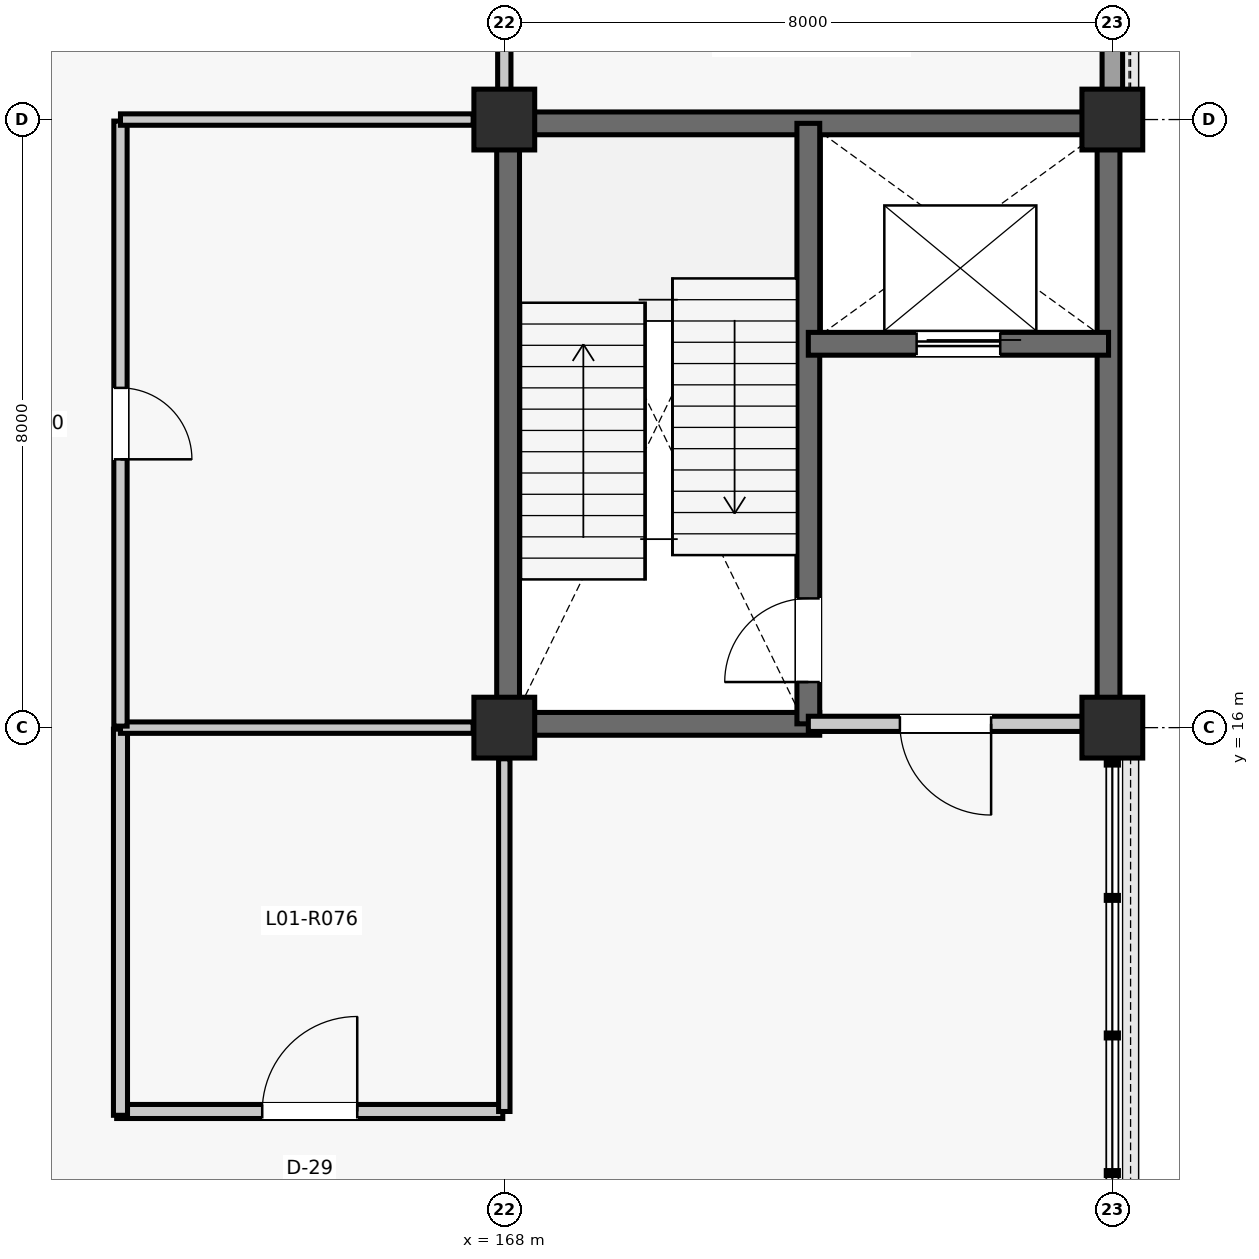
"""IFC4 building model, lengths in metres.
Left out: names, types, materials, properties, quantities, classifications, styles, units other than length and angle.
Written with IfcOpenShell. Run it as: python <this file> out.ifc"""

import sys

from ifc_helpers import new_model, si_unit, direction, frame, frame_2d, origin, origin_2d, place, context, subcontext, project, spatial, rectangle, extrude, element, fill, save


model = new_model("IFC4")
c1 = context("Model", 3, precision=1e-05, world=origin(), true_north=direction((0.0, 1.0)))
c2 = subcontext(c1, "Body", "Model", "MODEL_VIEW")
j1 = project(units=[si_unit("LENGTHUNIT", "METRE"), si_unit("PLANEANGLEUNIT", "RADIAN")], contexts=[c1])
p1 = place(None, origin())
s1 = spatial("IfcSite", under=j1, at=p1, CompositionType="ELEMENT")
p2 = place(p1, origin())
s2 = spatial("IfcBuilding", under=s1, at=p2, CompositionType="ELEMENT")
p3 = place(p2, frame((0.0, 0.0, 5.28)))
s3 = spatial("IfcBuildingStorey", under=s2, at=p3, CompositionType="ELEMENT", Elevation=5.28)
for number, where, z_axis, x_axis in (
    (1, (168.0, 16.0, 0.0), (0.0, 0.0, 1.0), (1.0, 0.0, 0.0)),
    (2, (168.0, 24.0, 0.0), (0.0, 0.0, 1.0), (1.0, 0.0, 0.0)),
    (3, (176.0, 16.0, 0.0), (0.0, 0.0, 1.0), (1.0, 0.0, 0.0)),
    (4, (176.0, 24.0, 0.0), (0.0, 0.0, 1.0), (1.0, 0.0, 0.0)),
):
    element("IfcColumn", number, at=place(p3, frame(where, z_axis=z_axis, x_axis=x_axis)), inside=s3, PredefinedType="COLUMN", context=c2, shape_type="SweptSolid", body=[
        extrude(rectangle(XDim=0.8, YDim=0.8, at=origin_2d()), origin(), (0.0, 0.0, 1.0), 4.62),
    ])
p4 = place(p3, frame((176.0, 24.385, 0.0), z_axis=(0.0, 0.0, 1.0), x_axis=(0.0, 1.0, 0.0)))
e5 = element("IfcWall", 5, at=p4, inside=s3, PredefinedType="SOLIDWALL", context=c2, shape_type="SweptSolid", body=[
    extrude(rectangle(XDim=7.33, YDim=0.27, at=frame_2d((3.665, 0.0))), origin(), (0.0, 0.0, 1.0), 3.914),
])
p5 = place(p4, frame((2.465, 0.0, 0.9)))
e6 = element("IfcOpeningElement", 6, at=p5, cuts=e5, PredefinedType="OPENING", context=c2, shape_type="SweptSolid", body=[
    extrude(rectangle(XDim=2.4, YDim=2.4, at=frame_2d((1.2, 1.2))), frame((0.0, 0.145, 0.0), z_axis=(0.0, -1.0, 0.0), x_axis=(1.0, 0.0, 0.0)), (0.0, 0.0, 1.0), 0.29),
])
for number, where, z_axis, x_axis in (
    (7, (168.05, 16.29, 0.0), (0.0, 0.0, 1.0), (0.0, 1.0, 0.0)),
    (8, (168.29, 23.95, 0.0), (0.0, 0.0, 1.0), (1.0, 0.0, 0.0)),
    (9, (175.95, 16.29, 0.0), (0.0, 0.0, 1.0), (0.0, 1.0, 0.0)),
):
    element("IfcWall", number, at=place(p3, frame(where, z_axis=z_axis, x_axis=x_axis)), inside=s3, PredefinedType="SHEAR", context=c2, shape_type="SweptSolid", body=[
        extrude(rectangle(XDim=7.42, YDim=0.3, at=frame_2d((3.71, 0.0))), origin(), (0.0, 0.0, 1.0), 4.335),
    ])
p6 = place(p3, frame((168.29, 16.05, 0.0), z_axis=(0.0, 0.0, 1.0), x_axis=(1.0, 0.0, 0.0)))
e10 = element("IfcWall", 10, at=p6, inside=s3, PredefinedType="SHEAR", context=c2, shape_type="SweptSolid", body=[
    extrude(rectangle(XDim=3.86, YDim=0.3, at=frame_2d((1.93, 0.0))), origin(), (0.0, 0.0, 1.0), 4.335),
])
p7 = place(p3, frame((172.0, 16.05, 0.0), z_axis=(0.0, 0.0, 1.0), x_axis=(0.0, 1.0, 0.0)))
e11 = element("IfcWall", 11, at=p7, inside=s3, PredefinedType="SHEAR", context=c2, shape_type="SweptSolid", body=[
    extrude(rectangle(XDim=7.9, YDim=0.3, at=frame_2d((3.95, 0.0))), origin(), (0.0, 0.0, 1.0), 4.335),
])
p8 = place(p7, frame((0.55, 0.0, 0.0)))
e12 = element("IfcOpeningElement", 12, at=p8, cuts=e11, PredefinedType="OPENING", context=c2, shape_type="SweptSolid", body=[
    extrude(rectangle(XDim=1.1, YDim=2.15, at=frame_2d((0.55, 1.075))), frame((0.0, 0.16, 0.0), z_axis=(0.0, -1.0, 0.0), x_axis=(1.0, 0.0, 0.0)), (0.0, 0.0, 1.0), 0.32),
])
p9 = place(p3, frame((172.0, 21.05, 0.0), z_axis=(0.0, 0.0, 1.0), x_axis=(1.0, 0.0, 0.0)))
e13 = element("IfcWall", 13, at=p9, inside=s3, PredefinedType="SHEAR", context=c2, shape_type="SweptSolid", body=[
    extrude(rectangle(XDim=3.95, YDim=0.3, at=frame_2d((1.975, 0.0))), origin(), (0.0, 0.0, 1.0), 4.335),
])
p10 = place(p9, frame((1.425, 0.0, 0.0)))
e14 = element("IfcOpeningElement", 14, at=p10, cuts=e13, PredefinedType="OPENING", context=c2, shape_type="SweptSolid", body=[
    extrude(rectangle(XDim=1.1, YDim=2.2, at=frame_2d((0.55, 1.1))), frame((0.0, 0.16, 0.0), z_axis=(0.0, -1.0, 0.0), x_axis=(1.0, 0.0, 0.0)), (0.0, 0.0, 1.0), 0.32),
])
p11 = place(p3, frame((172.0, 16.05, 0.0), z_axis=(0.0, 0.0, 1.0), x_axis=(1.0, 0.0, 0.0)))
e15 = element("IfcWall", 15, at=p11, inside=s3, PredefinedType="PARTITIONING", context=c2, shape_type="SweptSolid", body=[
    extrude(rectangle(XDim=3.61, YDim=0.2, at=frame_2d((1.805, 0.0))), origin(), (0.0, 0.0, 1.0), 3.781),
])
p12 = place(p11, frame((1.205, 0.0, 0.0)))
e16 = element("IfcOpeningElement", 16, at=p12, cuts=e15, PredefinedType="OPENING", context=c2, shape_type="SweptSolid", body=[
    extrude(rectangle(XDim=1.2, YDim=2.15, at=frame_2d((0.6, 1.075))), frame((0.0, 0.11, 0.0), z_axis=(0.0, -1.0, 0.0), x_axis=(1.0, 0.0, 0.0)), (0.0, 0.0, 1.0), 0.22),
])
p13 = place(p3, frame((162.9, 10.95, 0.0), z_axis=(0.0, 0.0, 1.0), x_axis=(1.0, 0.0, 0.0)))
e17 = element("IfcWall", 17, at=p13, inside=s3, PredefinedType="PARTITIONING", context=c2, shape_type="SweptSolid", body=[
    extrude(rectangle(XDim=5.08, YDim=0.185, at=frame_2d((2.54, 0.0))), origin(), (0.0, 0.0, 1.0), 3.781),
])
p14 = place(p13, frame((1.915, 0.0, 0.0)))
e18 = element("IfcOpeningElement", 18, at=p14, cuts=e17, PredefinedType="OPENING", context=c2, shape_type="SweptSolid", body=[
    extrude(rectangle(XDim=1.25, YDim=2.18, at=frame_2d((0.625, 1.09))), frame((0.0, 0.103, 0.0), z_axis=(0.0, -1.0, 0.0), x_axis=(1.0, 0.0, 0.0)), (0.0, 0.0, 1.0), 0.205),
])
p15 = place(p3, frame((162.95, 10.9, 0.0), z_axis=(0.0, 0.0, 1.0), x_axis=(0.0, 1.0, 0.0)))
e19 = element("IfcWall", 19, at=p15, inside=s3, PredefinedType="PARTITIONING", context=c2, shape_type="SweptSolid", body=[
    extrude(rectangle(XDim=5.08, YDim=0.185, at=frame_2d((2.54, 0.0))), origin(), (0.0, 0.0, 1.0), 3.771),
])
p16 = place(p3, frame((162.95, 16.0, 0.0), z_axis=(0.0, 0.0, 1.0), x_axis=(1.0, 0.0, 0.0)))
e20 = element("IfcWall", 20, at=p16, inside=s3, PredefinedType="PARTITIONING", context=c2, shape_type="SweptSolid", body=[
    extrude(rectangle(XDim=4.64, YDim=0.15, at=frame_2d((2.32, 0.0))), origin(), (0.0, 0.0, 1.0), 3.771),
])
p17 = place(p3, frame((168.0, 10.95, 0.0), z_axis=(0.0, 0.0, 1.0), x_axis=(0.0, 1.0, 0.0)))
e21 = element("IfcWall", 21, at=p17, inside=s3, PredefinedType="PARTITIONING", context=c2, shape_type="SweptSolid", body=[
    extrude(rectangle(XDim=4.64, YDim=0.15, at=frame_2d((2.32, 0.0))), origin(), (0.0, 0.0, 1.0), 3.781),
])
p18 = place(p3, frame((162.95, 16.02, 0.0), z_axis=(0.0, 0.0, 1.0), x_axis=(0.0, 1.0, 0.0)))
e22 = element("IfcWall", 22, at=p18, inside=s3, PredefinedType="PARTITIONING", context=c2, shape_type="SweptSolid", body=[
    extrude(rectangle(XDim=7.96, YDim=0.175, at=frame_2d((3.98, 0.0))), origin(), (0.0, 0.0, 1.0), 3.771),
])
p19 = place(p18, frame((3.51, 0.0, 0.0)))
e23 = element("IfcOpeningElement", 23, at=p19, cuts=e22, PredefinedType="OPENING", context=c2, shape_type="SweptSolid", body=[
    extrude(rectangle(XDim=0.94, YDim=2.12, at=frame_2d((0.47, 1.06))), frame((0.0, 0.097, 0.0), z_axis=(0.0, -1.0, 0.0), x_axis=(1.0, 0.0, 0.0)), (0.0, 0.0, 1.0), 0.195),
])
p20 = place(p3, frame((162.95, 24.0, 0.0), z_axis=(0.0, 0.0, 1.0), x_axis=(1.0, 0.0, 0.0)))
e24 = element("IfcWall", 24, at=p20, inside=s3, PredefinedType="PARTITIONING", context=c2, shape_type="SweptSolid", body=[
    extrude(rectangle(XDim=4.64, YDim=0.15, at=frame_2d((2.32, 0.0))), origin(), (0.0, 0.0, 1.0), 3.781),
])
p21 = place(p3, frame((168.0, 24.39, 0.0), z_axis=(0.0, 0.0, 1.0), x_axis=(0.0, 1.0, 0.0)))
e25 = element("IfcWall", 25, at=p21, inside=s3, PredefinedType="PARTITIONING", context=c2, shape_type="SweptSolid", body=[
    extrude(rectangle(XDim=7.32, YDim=0.175, at=frame_2d((3.66, 0.0))), origin(), (0.0, 0.0, 1.0), 3.787),
])
p22 = place(p21, frame((0.52, 0.0, 0.0)))
e26 = element("IfcOpeningElement", 26, at=p22, cuts=e25, PredefinedType="OPENING", context=c2, shape_type="SweptSolid", body=[
    extrude(rectangle(XDim=0.94, YDim=2.12, at=frame_2d((0.47, 1.06))), frame((0.0, 0.097, 0.0), z_axis=(0.0, -1.0, 0.0), x_axis=(1.0, 0.0, 0.0)), (0.0, 0.0, 1.0), 0.195),
])
p23 = place(p8, origin())
e27 = element("IfcDoor", 27, at=p23, inside=s3, OperationType="SINGLE_SWING_LEFT", PredefinedType="DOOR", context=c2, shape_type="SweptSolid", body=[
    extrude(rectangle(XDim=1.1, YDim=2.15, at=frame_2d((0.55, 1.075))), frame((0.0, 0.025, 0.0), z_axis=(0.0, -1.0, 0.0), x_axis=(1.0, 0.0, 0.0)), (0.0, 0.0, 1.0), 0.05),
])
fill(e12, e27)
p24 = place(p10, origin())
e28 = element("IfcDoor", 28, at=p24, inside=s3, OperationType="SLIDING_TO_LEFT", PredefinedType="DOOR", context=c2, shape_type="SweptSolid", body=[
    extrude(rectangle(XDim=1.1, YDim=2.2, at=frame_2d((0.55, 1.1))), frame((0.0, 0.025, 0.0), z_axis=(0.0, -1.0, 0.0), x_axis=(1.0, 0.0, 0.0)), (0.0, 0.0, 1.0), 0.05),
])
fill(e14, e28)
p25 = place(p12, frame((1.2, 0.0, 0.0), z_axis=(0.0, 0.0, 1.0), x_axis=(-1.0, 0.0, 0.0)))
e29 = element("IfcDoor", 29, at=p25, inside=s3, OperationType="SINGLE_SWING_RIGHT", PredefinedType="DOOR", context=c2, shape_type="SweptSolid", body=[
    extrude(rectangle(XDim=1.2, YDim=2.15, at=frame_2d((0.6, 1.075))), frame((0.0, 0.025, 0.0), z_axis=(0.0, -1.0, 0.0), x_axis=(1.0, 0.0, 0.0)), (0.0, 0.0, 1.0), 0.05),
])
fill(e16, e29)
p26 = place(p14, origin())
e30 = element("IfcDoor", 30, at=p26, inside=s3, OperationType="SINGLE_SWING_RIGHT", PredefinedType="DOOR", context=c2, shape_type="SweptSolid", body=[
    extrude(rectangle(XDim=1.25, YDim=2.18, at=frame_2d((0.625, 1.09))), frame((0.0, 0.025, 0.0), z_axis=(0.0, -1.0, 0.0), x_axis=(1.0, 0.0, 0.0)), (0.0, 0.0, 1.0), 0.05),
])
fill(e18, e30)
p27 = place(p19, frame((0.94, 0.0, 0.0), z_axis=(0.0, 0.0, 1.0), x_axis=(-1.0, 0.0, 0.0)))
e31 = element("IfcDoor", 31, at=p27, inside=s3, OperationType="SINGLE_SWING_LEFT", PredefinedType="DOOR", context=c2, shape_type="SweptSolid", body=[
    extrude(rectangle(XDim=0.94, YDim=2.12, at=frame_2d((0.47, 1.06))), frame((0.0, 0.025, 0.0), z_axis=(0.0, -1.0, 0.0), x_axis=(1.0, 0.0, 0.0)), (0.0, 0.0, 1.0), 0.05),
])
fill(e23, e31)
save(model, sys.argv[1])
